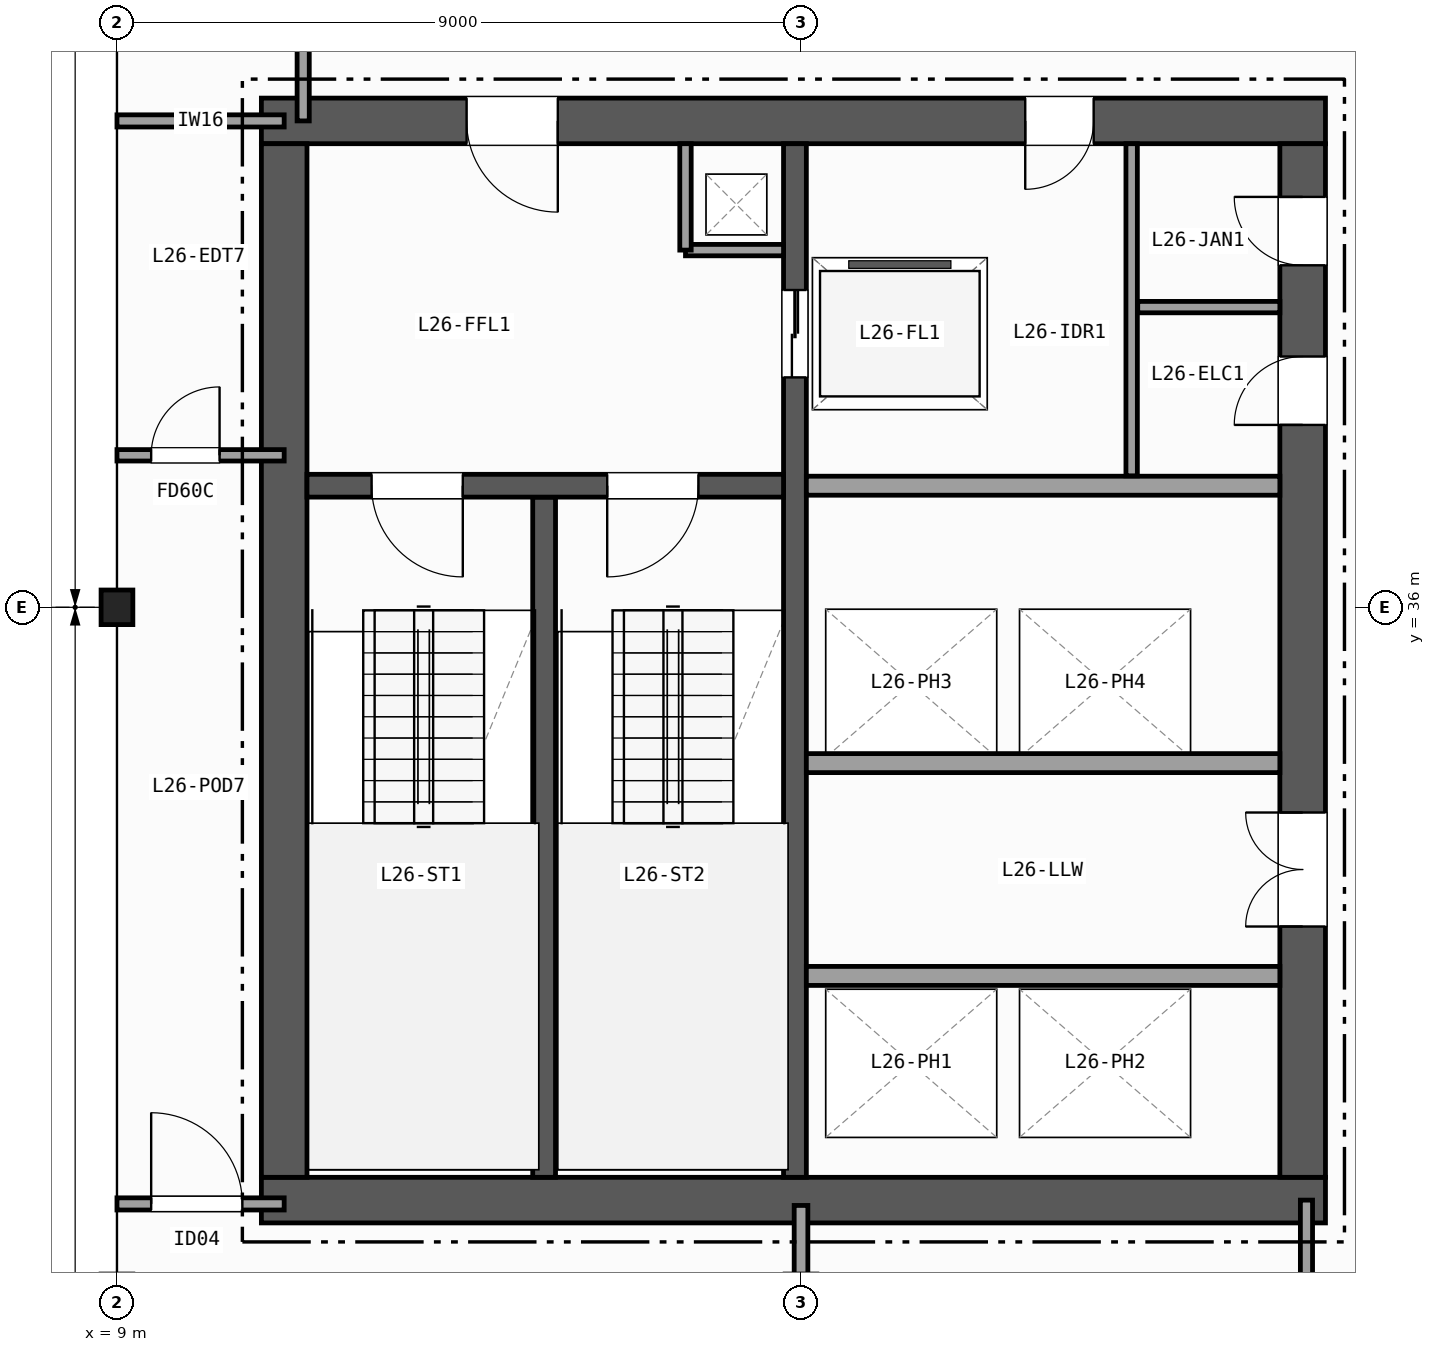
"""IFC4 building model, lengths in metres.
Left out: names, types, materials, properties, quantities, classifications, styles, units other than length and angle.
Written with IfcOpenShell. Run it as: python <this file> out.ifc"""

import sys

from ifc_helpers import new_model, si_unit, direction, frame, frame_2d, origin, origin_2d, place, context, subcontext, project, spatial, rectangle, i_section, extrude, element, fill, save


model = new_model("IFC4")
c1 = context("Model", 3, precision=1e-05, world=origin(), true_north=direction((0.0, 1.0)))
c2 = subcontext(c1, "Body", "Model", "MODEL_VIEW")
j1 = project(units=[si_unit("LENGTHUNIT", "METRE"), si_unit("PLANEANGLEUNIT", "RADIAN")], contexts=[c1])
p1 = place(None, origin())
s1 = spatial("IfcSite", under=j1, at=p1, CompositionType="ELEMENT")
p2 = place(p1, origin())
s2 = spatial("IfcBuilding", under=s1, at=p2, CompositionType="ELEMENT")
p3 = place(p2, frame((0.0, 0.0, 110.0)))
s3 = spatial("IfcBuildingStorey", under=s2, at=p3, CompositionType="ELEMENT", Elevation=110.0)
p4 = place(p3, frame((9.0, 36.0, 0.0), z_axis=(0.0, 0.0, 1.0), x_axis=(1.0, 0.0, 0.0)))
e1 = element("IfcColumn", 1, at=p4, inside=s3, PredefinedType="COLUMN", context=c2, shape_type="SweptSolid", body=[
    extrude(i_section(OverallWidth=0.418, OverallDepth=0.455, WebThickness=0.042, FlangeThickness=0.068, FilletRadius=0.015, at=origin_2d()), origin(), (0.0, 0.0, 1.0), 3.7),
])
p5 = place(p3, frame((10.9, 28.2, 0.0), z_axis=(0.0, 0.0, 1.0), x_axis=(1.0, 0.0, 0.0)))
e2 = element("IfcWall", 2, at=p5, inside=s3, PredefinedType="SHEAR", context=c2, shape_type="SweptSolid", body=[
    extrude(rectangle(XDim=14.0, YDim=0.6, at=frame_2d((7.0, 0.0))), origin(), (0.0, 0.0, 1.0), 3.42),
])
p6 = place(p3, frame((24.9, 42.4, 0.0), z_axis=(0.0, 0.0, 1.0), x_axis=(-1.0, 0.0, 0.0)))
e3 = element("IfcWall", 3, at=p6, inside=s3, PredefinedType="SHEAR", context=c2, shape_type="SweptSolid", body=[
    extrude(rectangle(XDim=14.0, YDim=0.6, at=frame_2d((7.0, 0.0))), origin(), (0.0, 0.0, 1.0), 3.42),
])
p7 = place(p6, frame((10.1, 0.0, 0.0)))
e4 = element("IfcOpeningElement", 4, at=p7, cuts=e3, PredefinedType="OPENING", context=c2, shape_type="SweptSolid", body=[
    extrude(rectangle(XDim=1.2, YDim=2.15, at=frame_2d((0.6, 1.075))), frame((0.0, 0.31, 0.0), z_axis=(0.0, -1.0, 0.0), x_axis=(1.0, 0.0, 0.0)), (0.0, 0.0, 1.0), 0.62),
])
p8 = place(p6, frame((3.05, 0.0, 0.0)))
e5 = element("IfcOpeningElement", 5, at=p8, cuts=e3, PredefinedType="OPENING", context=c2, shape_type="SweptSolid", body=[
    extrude(rectangle(XDim=0.9, YDim=2.1, at=frame_2d((0.45, 1.05))), frame((0.0, 0.31, 0.0), z_axis=(0.0, -1.0, 0.0), x_axis=(1.0, 0.0, 0.0)), (0.0, 0.0, 1.0), 0.62),
])
p9 = place(p3, frame((11.2, 42.1, 0.0), z_axis=(0.0, 0.0, 1.0), x_axis=(0.0, -1.0, 0.0)))
e6 = element("IfcWall", 6, at=p9, inside=s3, PredefinedType="SHEAR", context=c2, shape_type="SweptSolid", body=[
    extrude(rectangle(XDim=13.6, YDim=0.6, at=frame_2d((6.8, 0.0))), origin(), (0.0, 0.0, 1.0), 3.42),
])
p10 = place(p3, frame((24.6, 28.5, 0.0), z_axis=(0.0, 0.0, 1.0), x_axis=(0.0, 1.0, 0.0)))
e7 = element("IfcWall", 7, at=p10, inside=s3, PredefinedType="SHEAR", context=c2, shape_type="SweptSolid", body=[
    extrude(rectangle(XDim=13.6, YDim=0.6, at=frame_2d((6.8, 0.0))), origin(), (0.0, 0.0, 1.0), 3.42),
])
p11 = place(p10, frame((3.3, 0.0, 0.0)))
e8 = element("IfcOpeningElement", 8, at=p11, cuts=e7, PredefinedType="OPENING", context=c2, shape_type="SweptSolid", body=[
    extrude(rectangle(XDim=1.5, YDim=2.2, at=frame_2d((0.75, 1.1))), frame((0.0, 0.31, 0.0), z_axis=(0.0, -1.0, 0.0), x_axis=(1.0, 0.0, 0.0)), (0.0, 0.0, 1.0), 0.62),
])
p12 = place(p10, frame((9.9, 0.0, 0.0)))
e9 = element("IfcOpeningElement", 9, at=p12, cuts=e7, PredefinedType="OPENING", context=c2, shape_type="SweptSolid", body=[
    extrude(rectangle(XDim=0.9, YDim=2.1, at=frame_2d((0.45, 1.05))), frame((0.0, 0.31, 0.0), z_axis=(0.0, -1.0, 0.0), x_axis=(1.0, 0.0, 0.0)), (0.0, 0.0, 1.0), 0.62),
])
p13 = place(p10, frame((12.0, 0.0, 0.0)))
e10 = element("IfcOpeningElement", 10, at=p13, cuts=e7, PredefinedType="OPENING", context=c2, shape_type="SweptSolid", body=[
    extrude(rectangle(XDim=0.9, YDim=2.1, at=frame_2d((0.45, 1.05))), frame((0.0, 0.31, 0.0), z_axis=(0.0, -1.0, 0.0), x_axis=(1.0, 0.0, 0.0)), (0.0, 0.0, 1.0), 0.62),
])
p14 = place(p3, frame((14.62, 28.5, 0.0), z_axis=(0.0, 0.0, 1.0), x_axis=(0.0, 1.0, 0.0)))
e11 = element("IfcWall", 11, at=p14, inside=s3, PredefinedType="SHEAR", context=c2, shape_type="SweptSolid", body=[
    extrude(rectangle(XDim=8.95, YDim=0.3, at=frame_2d((4.475, 0.0))), origin(), (0.0, 0.0, 1.0), 3.42),
])
p15 = place(p3, frame((17.92, 42.1, 0.0), z_axis=(0.0, 0.0, 1.0), x_axis=(0.0, -1.0, 0.0)))
e12 = element("IfcWall", 12, at=p15, inside=s3, PredefinedType="SHEAR", context=c2, shape_type="SweptSolid", body=[
    extrude(rectangle(XDim=13.6, YDim=0.3, at=frame_2d((6.8, 0.0))), origin(), (0.0, 0.0, 1.0), 3.42),
])
p16 = place(p15, frame((1.925, 0.0, 0.0)))
e13 = element("IfcOpeningElement", 13, at=p16, cuts=e12, PredefinedType="OPENING", context=c2, shape_type="SweptSolid", body=[
    extrude(rectangle(XDim=1.15, YDim=2.15, at=frame_2d((0.575, 1.075))), frame((0.0, 0.16, 0.0), z_axis=(0.0, -1.0, 0.0), x_axis=(1.0, 0.0, 0.0)), (0.0, 0.0, 1.0), 0.32),
])
p17 = place(p3, frame((17.77, 37.6, 0.0), z_axis=(0.0, 0.0, 1.0), x_axis=(-1.0, 0.0, 0.0)))
e14 = element("IfcWall", 14, at=p17, inside=s3, PredefinedType="SHEAR", context=c2, shape_type="SweptSolid", body=[
    extrude(rectangle(XDim=6.27, YDim=0.3, at=frame_2d((3.135, 0.0))), origin(), (0.0, 0.0, 1.0), 3.42),
])
p18 = place(p17, frame((4.22, 0.0, 0.0)))
e15 = element("IfcOpeningElement", 15, at=p18, cuts=e14, PredefinedType="OPENING", context=c2, shape_type="SweptSolid", body=[
    extrude(rectangle(XDim=1.2, YDim=2.15, at=frame_2d((0.6, 1.075))), frame((0.0, 0.16, 0.0), z_axis=(0.0, -1.0, 0.0), x_axis=(1.0, 0.0, 0.0)), (0.0, 0.0, 1.0), 0.32),
])
p19 = place(p17, frame((1.12, 0.0, 0.0)))
e16 = element("IfcOpeningElement", 16, at=p19, cuts=e14, PredefinedType="OPENING", context=c2, shape_type="SweptSolid", body=[
    extrude(rectangle(XDim=1.2, YDim=2.15, at=frame_2d((0.6, 1.075))), frame((0.0, 0.16, 0.0), z_axis=(0.0, -1.0, 0.0), x_axis=(1.0, 0.0, 0.0)), (0.0, 0.0, 1.0), 0.32),
])
p20 = place(p3, frame((16.48, 40.7, 0.0), z_axis=(0.0, 0.0, 1.0), x_axis=(1.0, 0.0, 0.0)))
e17 = element("IfcWall", 17, at=p20, inside=s3, PredefinedType="PARTITIONING", context=c2, shape_type="SweptSolid", body=[
    extrude(rectangle(XDim=1.29, YDim=0.15, at=frame_2d((0.645, 0.0))), origin(), (0.0, 0.0, 1.0), 3.42),
])
p21 = place(p3, frame((16.48, 40.7, 0.0), z_axis=(0.0, 0.0, 1.0), x_axis=(0.0, 1.0, 0.0)))
e18 = element("IfcWall", 18, at=p21, inside=s3, PredefinedType="PARTITIONING", context=c2, shape_type="SweptSolid", body=[
    extrude(rectangle(XDim=1.4, YDim=0.15, at=frame_2d((0.7, 0.0))), origin(), (0.0, 0.0, 1.0), 3.42),
])
for number, where, z_axis, x_axis in (
    (19, (18.07, 37.6, 0.0), (0.0, 0.0, 1.0), (1.0, 0.0, 0.0)),
    (20, (18.07, 31.15, 0.0), (0.0, 0.0, 1.0), (1.0, 0.0, 0.0)),
    (21, (24.3, 33.95, 0.0), (0.0, 0.0, 1.0), (-1.0, 0.0, 0.0)),
):
    element("IfcWall", number, at=place(p3, frame(where, z_axis=z_axis, x_axis=x_axis)), inside=s3, PredefinedType="PARTITIONING", context=c2, shape_type="SweptSolid", body=[
        extrude(rectangle(XDim=6.23, YDim=0.25, at=frame_2d((3.115, 0.0))), origin(), (0.0, 0.0, 1.0), 3.42),
    ])
p22 = place(p3, frame((22.35, 37.73, 0.0), z_axis=(0.0, 0.0, 1.0), x_axis=(0.0, 1.0, 0.0)))
e22 = element("IfcWall", 22, at=p22, inside=s3, PredefinedType="PARTITIONING", context=c2, shape_type="SweptSolid", body=[
    extrude(rectangle(XDim=4.37, YDim=0.15, at=frame_2d((2.185, 0.0))), origin(), (0.0, 0.0, 1.0), 3.42),
])
p23 = place(p3, frame((22.43, 39.95, 0.0), z_axis=(0.0, 0.0, 1.0), x_axis=(1.0, 0.0, 0.0)))
e23 = element("IfcWall", 23, at=p23, inside=s3, PredefinedType="PARTITIONING", context=c2, shape_type="SweptSolid", body=[
    extrude(rectangle(XDim=1.87, YDim=0.15, at=frame_2d((0.935, 0.0))), origin(), (0.0, 0.0, 1.0), 3.42),
])
p24 = place(p3, frame((9.0, 28.15, 0.0), z_axis=(0.0, 0.0, 1.0), x_axis=(1.0, 0.0, 0.0)))
e24 = element("IfcWall", 24, at=p24, inside=s3, PredefinedType="PARTITIONING", context=c2, shape_type="SweptSolid", body=[
    extrude(rectangle(XDim=2.2, YDim=0.16, at=frame_2d((1.1, 0.0))), origin(), (0.0, 0.0, 1.0), 2.634),
])
p25 = place(p24, frame((0.45, 0.0, 0.0)))
e25 = element("IfcOpeningElement", 25, at=p25, cuts=e24, PredefinedType="OPENING", context=c2, shape_type="SweptSolid", body=[
    extrude(rectangle(XDim=1.2, YDim=2.15, at=frame_2d((0.6, 1.075))), frame((0.0, 0.09, 0.0), z_axis=(0.0, -1.0, 0.0), x_axis=(1.0, 0.0, 0.0)), (0.0, 0.0, 1.0), 0.18),
])
p26 = place(p3, frame((9.0, 42.4, 0.0), z_axis=(0.0, 0.0, 1.0), x_axis=(1.0, 0.0, 0.0)))
e26 = element("IfcWall", 26, at=p26, inside=s3, PredefinedType="PARTITIONING", context=c2, shape_type="SweptSolid", body=[
    extrude(rectangle(XDim=2.2, YDim=0.16, at=frame_2d((1.1, 0.0))), origin(), (0.0, 0.0, 1.0), 2.634),
])
p27 = place(p3, frame((11.45, 42.4, 0.0), z_axis=(0.0, 0.0, 1.0), x_axis=(0.0, 1.0, 0.0)))
e27 = element("IfcWall", 27, at=p27, inside=s3, PredefinedType="PARTITIONING", context=c2, shape_type="SweptSolid", body=[
    extrude(rectangle(XDim=2.1, YDim=0.16, at=frame_2d((1.05, 0.0))), origin(), (0.0, 0.0, 1.0), 3.42),
])
p28 = place(p3, frame((9.0, 38.0, 0.0), z_axis=(0.0, 0.0, 1.0), x_axis=(1.0, 0.0, 0.0)))
e28 = element("IfcWall", 28, at=p28, inside=s3, PredefinedType="PARTITIONING", context=c2, shape_type="SweptSolid", body=[
    extrude(rectangle(XDim=2.2, YDim=0.15, at=frame_2d((1.1, 0.0))), origin(), (0.0, 0.0, 1.0), 2.634),
])
p29 = place(p28, frame((0.45, 0.0, 0.0)))
e29 = element("IfcOpeningElement", 29, at=p29, cuts=e28, PredefinedType="OPENING", context=c2, shape_type="SweptSolid", body=[
    extrude(rectangle(XDim=0.9, YDim=2.1, at=frame_2d((0.45, 1.05))), frame((0.0, 0.085, 0.0), z_axis=(0.0, -1.0, 0.0), x_axis=(1.0, 0.0, 0.0)), (0.0, 0.0, 1.0), 0.17),
])
p30 = place(p3, frame((24.65, 9.0, 0.0), z_axis=(0.0, 0.0, 1.0), x_axis=(0.0, 1.0, 0.0)))
e30 = element("IfcWall", 30, at=p30, inside=s3, PredefinedType="PARTITIONING", context=c2, shape_type="SweptSolid", body=[
    extrude(rectangle(XDim=19.2, YDim=0.16, at=frame_2d((9.6, 0.0))), origin(), (0.0, 0.0, 1.0), 2.634),
])
p31 = place(p30, frame((3.2, 0.0, 0.0)))
e31 = element("IfcOpeningElement", 31, at=p31, cuts=e30, PredefinedType="OPENING", context=c2, shape_type="SweptSolid", body=[
    extrude(rectangle(XDim=0.95, YDim=2.1, at=frame_2d((0.475, 1.05))), frame((0.0, 0.09, 0.0), z_axis=(0.0, -1.0, 0.0), x_axis=(1.0, 0.0, 0.0)), (0.0, 0.0, 1.0), 0.18),
])
p32 = place(p30, frame((12.765, 0.0, 0.0)))
e32 = element("IfcOpeningElement", 32, at=p32, cuts=e30, PredefinedType="OPENING", context=c2, shape_type="SweptSolid", body=[
    extrude(rectangle(XDim=1.0, YDim=2.1, at=frame_2d((0.5, 1.05))), frame((0.0, 0.09, 0.0), z_axis=(0.0, -1.0, 0.0), x_axis=(1.0, 0.0, 0.0)), (0.0, 0.0, 1.0), 0.18),
])
p33 = place(p3, frame((18.0, 9.0, 0.0), z_axis=(0.0, 0.0, 1.0), x_axis=(0.0, 1.0, 0.0)))
e33 = element("IfcWall", 33, at=p33, inside=s3, PredefinedType="PARTITIONING", context=c2, shape_type="SweptSolid", body=[
    extrude(rectangle(XDim=19.13, YDim=0.18, at=frame_2d((9.565, 0.0))), origin(), (0.0, 0.0, 1.0), 2.634),
])
p34 = place(p33, frame((2.2, 0.0, 0.0)))
e34 = element("IfcOpeningElement", 34, at=p34, cuts=e33, PredefinedType="OPENING", context=c2, shape_type="SweptSolid", body=[
    extrude(rectangle(XDim=1.05, YDim=2.15, at=frame_2d((0.525, 1.075))), frame((0.0, 0.1, 0.0), z_axis=(0.0, -1.0, 0.0), x_axis=(1.0, 0.0, 0.0)), (0.0, 0.0, 1.0), 0.2),
])
p35 = place(p33, frame((13.5, 0.0, 0.0)))
e35 = element("IfcOpeningElement", 35, at=p35, cuts=e33, PredefinedType="OPENING", context=c2, shape_type="SweptSolid", body=[
    extrude(rectangle(XDim=1.2, YDim=2.15, at=frame_2d((0.6, 1.075))), frame((0.0, 0.1, 0.0), z_axis=(0.0, -1.0, 0.0), x_axis=(1.0, 0.0, 0.0)), (0.0, 0.0, 1.0), 0.2),
])
p36 = place(p18, origin())
e36 = element("IfcDoor", 36, at=p36, inside=s3, OperationType="SINGLE_SWING_LEFT", PredefinedType="DOOR", context=c2, shape_type="SweptSolid", body=[
    extrude(rectangle(XDim=1.2, YDim=2.15, at=frame_2d((0.6, 1.075))), frame((0.0, 0.025, 0.0), z_axis=(0.0, -1.0, 0.0), x_axis=(1.0, 0.0, 0.0)), (0.0, 0.0, 1.0), 0.05),
])
fill(e15, e36)
p37 = place(p19, origin())
e37 = element("IfcDoor", 37, at=p37, inside=s3, OperationType="SINGLE_SWING_RIGHT", PredefinedType="DOOR", context=c2, shape_type="SweptSolid", body=[
    extrude(rectangle(XDim=1.2, YDim=2.15, at=frame_2d((0.6, 1.075))), frame((0.0, 0.025, 0.0), z_axis=(0.0, -1.0, 0.0), x_axis=(1.0, 0.0, 0.0)), (0.0, 0.0, 1.0), 0.05),
])
fill(e16, e37)
p38 = place(p11, origin())
e38 = element("IfcDoor", 38, at=p38, inside=s3, OperationType="DOUBLE_DOOR_SINGLE_SWING", PredefinedType="DOOR", context=c2, shape_type="SweptSolid", body=[
    extrude(rectangle(XDim=1.5, YDim=2.2, at=frame_2d((0.75, 1.1))), frame((0.0, 0.025, 0.0), z_axis=(0.0, -1.0, 0.0), x_axis=(1.0, 0.0, 0.0)), (0.0, 0.0, 1.0), 0.05),
])
fill(e8, e38)
p39 = place(p7, origin())
e39 = element("IfcDoor", 39, at=p39, inside=s3, OperationType="SINGLE_SWING_LEFT", PredefinedType="DOOR", context=c2, shape_type="SweptSolid", body=[
    extrude(rectangle(XDim=1.2, YDim=2.15, at=frame_2d((0.6, 1.075))), frame((0.0, 0.025, 0.0), z_axis=(0.0, -1.0, 0.0), x_axis=(1.0, 0.0, 0.0)), (0.0, 0.0, 1.0), 0.05),
])
fill(e4, e39)
p40 = place(p12, origin())
e40 = element("IfcDoor", 40, at=p40, inside=s3, OperationType="SINGLE_SWING_LEFT", PredefinedType="DOOR", context=c2, shape_type="SweptSolid", body=[
    extrude(rectangle(XDim=0.9, YDim=2.1, at=frame_2d((0.45, 1.05))), frame((0.0, 0.025, 0.0), z_axis=(0.0, -1.0, 0.0), x_axis=(1.0, 0.0, 0.0)), (0.0, 0.0, 1.0), 0.05),
])
fill(e9, e40)
p41 = place(p8, origin())
e41 = element("IfcDoor", 41, at=p41, inside=s3, OperationType="SINGLE_SWING_RIGHT", PredefinedType="DOOR", context=c2, shape_type="SweptSolid", body=[
    extrude(rectangle(XDim=0.9, YDim=2.1, at=frame_2d((0.45, 1.05))), frame((0.0, 0.025, 0.0), z_axis=(0.0, -1.0, 0.0), x_axis=(1.0, 0.0, 0.0)), (0.0, 0.0, 1.0), 0.05),
])
fill(e5, e41)
p42 = place(p13, origin())
e42 = element("IfcDoor", 42, at=p42, inside=s3, OperationType="SINGLE_SWING_RIGHT", PredefinedType="DOOR", context=c2, shape_type="SweptSolid", body=[
    extrude(rectangle(XDim=0.9, YDim=2.1, at=frame_2d((0.45, 1.05))), frame((0.0, 0.025, 0.0), z_axis=(0.0, -1.0, 0.0), x_axis=(1.0, 0.0, 0.0)), (0.0, 0.0, 1.0), 0.05),
])
fill(e10, e42)
p43 = place(p16, origin())
e43 = element("IfcDoor", 43, at=p43, inside=s3, OperationType="DOUBLE_DOOR_SLIDING", PredefinedType="DOOR", context=c2, shape_type="SweptSolid", body=[
    extrude(rectangle(XDim=1.15, YDim=2.15, at=frame_2d((0.575, 1.075))), frame((0.0, 0.025, 0.0), z_axis=(0.0, -1.0, 0.0), x_axis=(1.0, 0.0, 0.0)), (0.0, 0.0, 1.0), 0.05),
])
fill(e13, e43)
p44 = place(p25, origin())
e44 = element("IfcDoor", 44, at=p44, inside=s3, OperationType="SINGLE_SWING_LEFT", PredefinedType="DOOR", context=c2, shape_type="SweptSolid", body=[
    extrude(rectangle(XDim=1.2, YDim=2.15, at=frame_2d((0.6, 1.075))), frame((0.0, 0.025, 0.0), z_axis=(0.0, -1.0, 0.0), x_axis=(1.0, 0.0, 0.0)), (0.0, 0.0, 1.0), 0.05),
])
fill(e25, e44)
p45 = place(p29, origin())
e45 = element("IfcDoor", 45, at=p45, inside=s3, OperationType="SINGLE_SWING_RIGHT", PredefinedType="DOOR", context=c2, shape_type="SweptSolid", body=[
    extrude(rectangle(XDim=0.9, YDim=2.1, at=frame_2d((0.45, 1.05))), frame((0.0, 0.025, 0.0), z_axis=(0.0, -1.0, 0.0), x_axis=(1.0, 0.0, 0.0)), (0.0, 0.0, 1.0), 0.05),
])
fill(e29, e45)
save(model, sys.argv[1])
